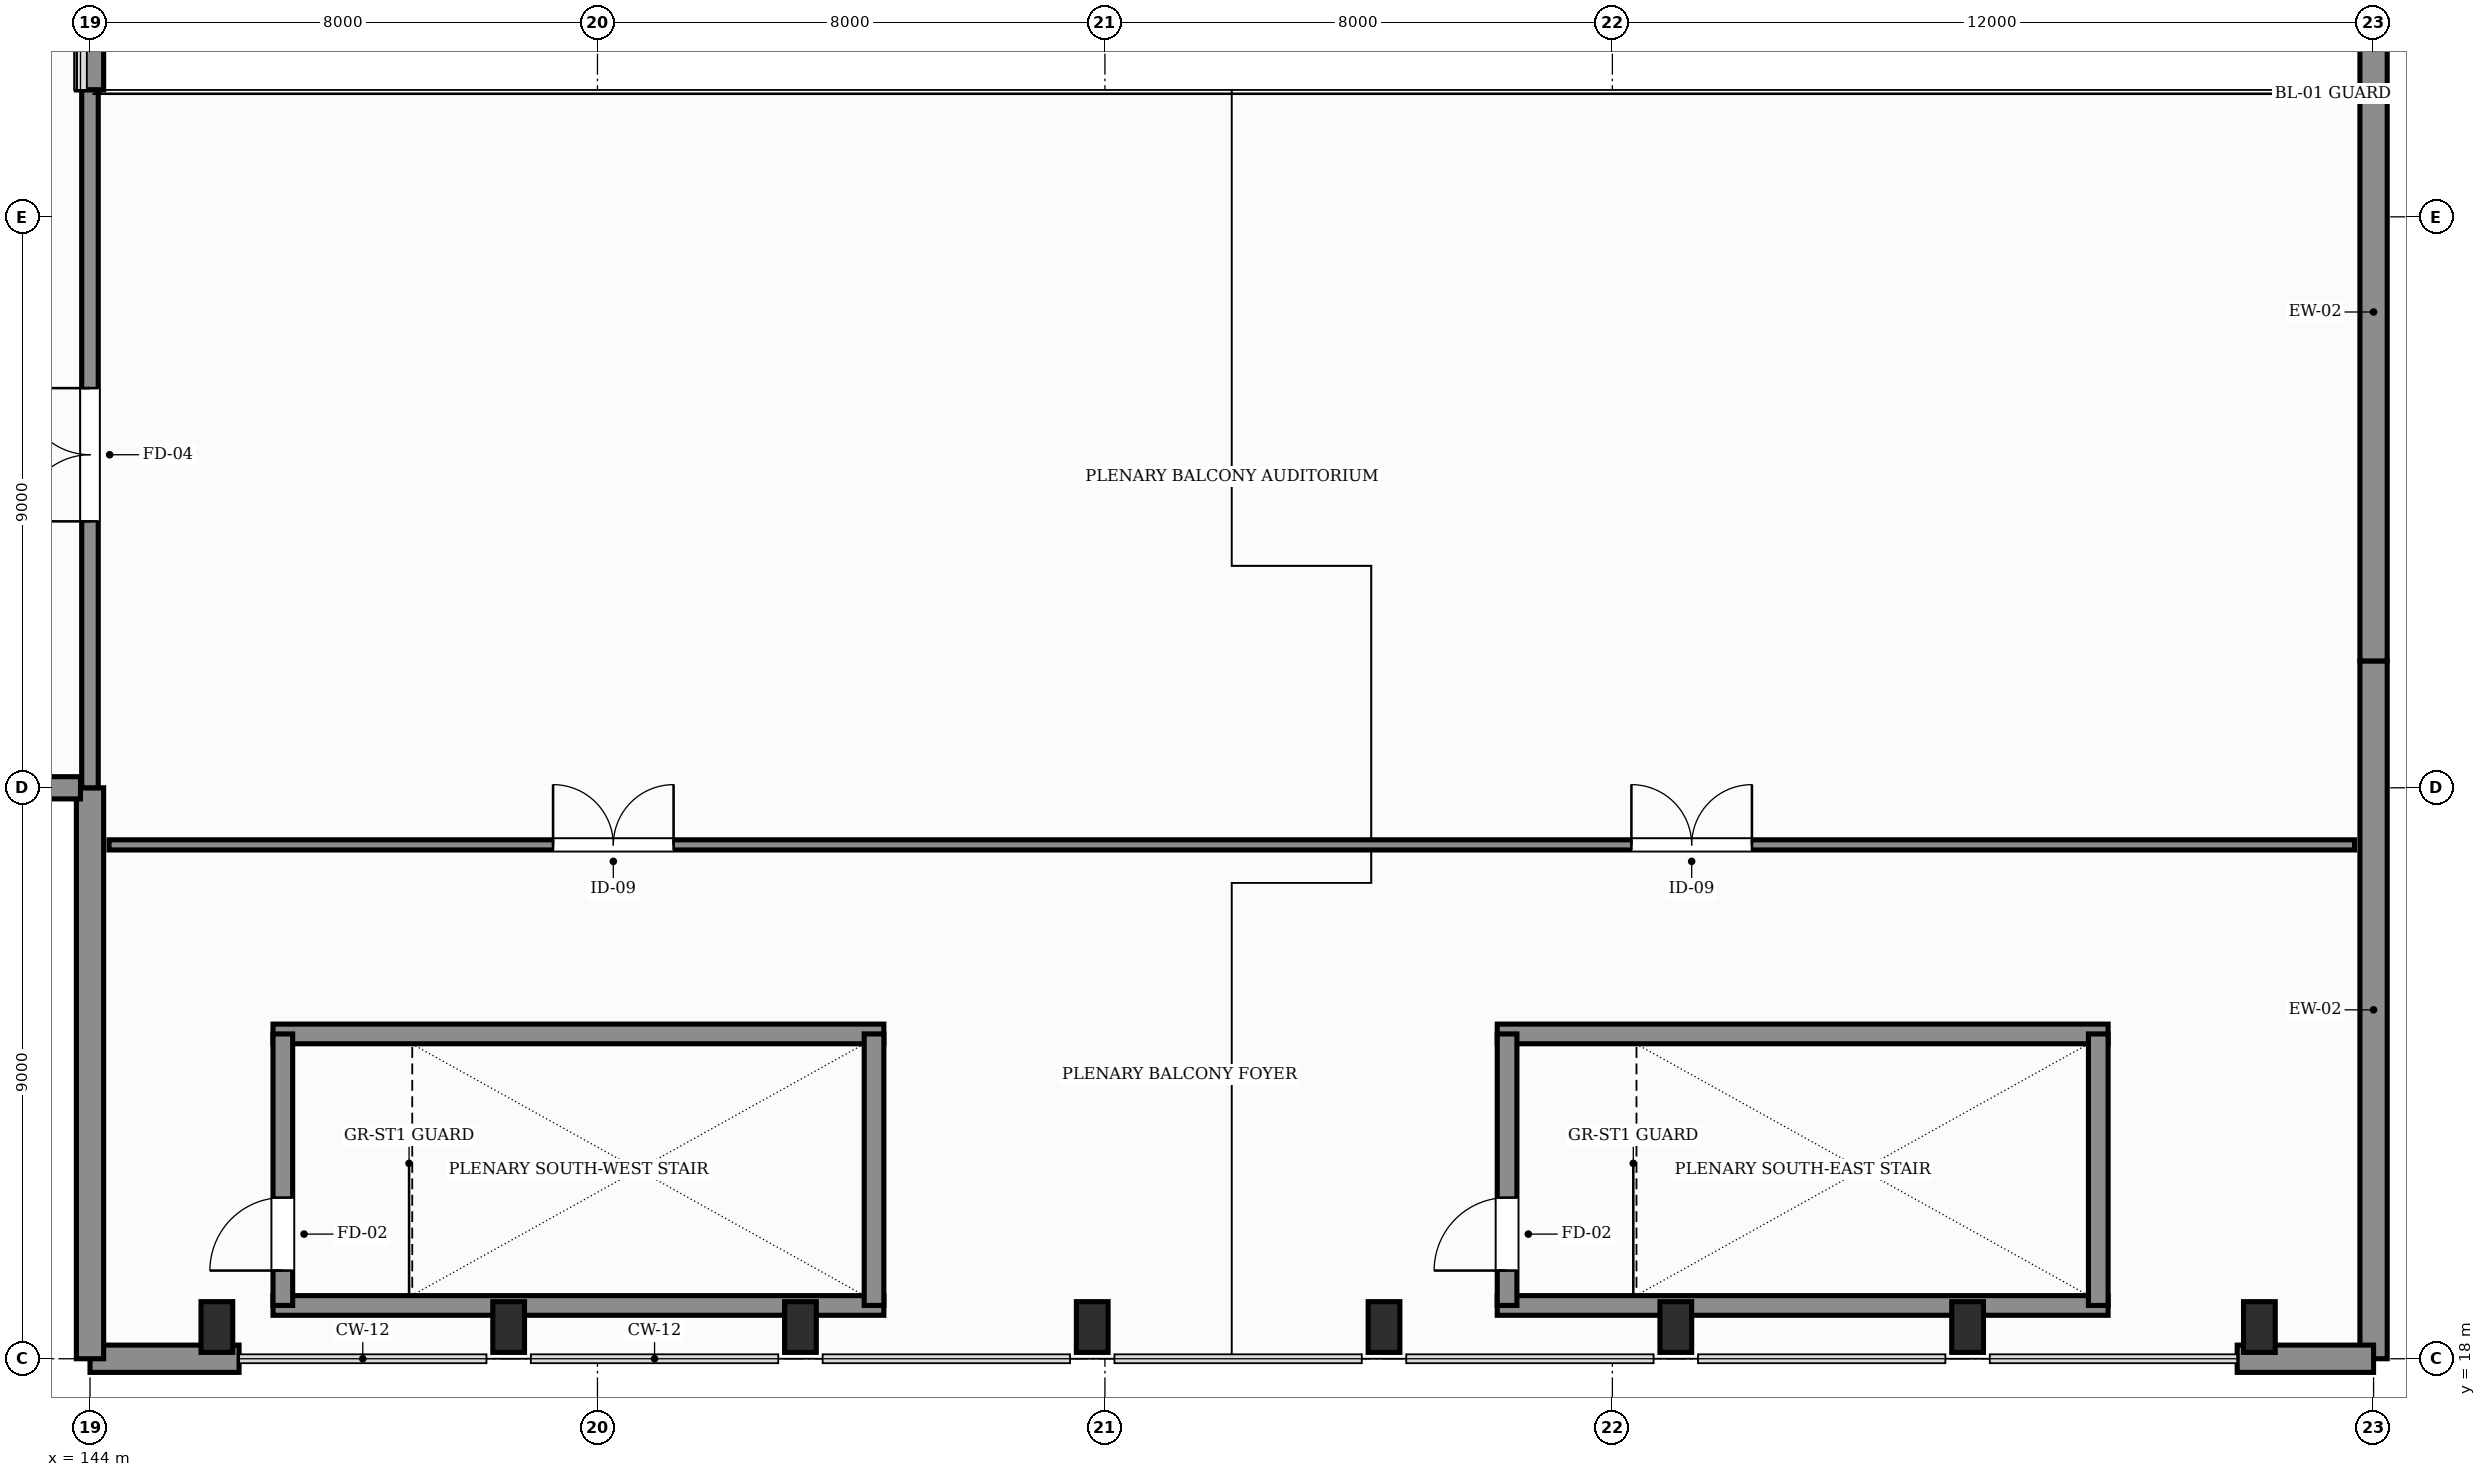
"""IFC4 building model, lengths in metres.
Left out: names, types, materials, properties, quantities, classifications, styles, units other than length and angle.
Written with IfcOpenShell. Run it as: python <this file> out.ifc"""

import sys

from ifc_helpers import new_model, si_unit, direction, frame, frame_2d, origin, origin_2d, place, context, subcontext, project, spatial, rectangle, extrude, element, fill, save


model = new_model("IFC4")
c1 = context("Model", 3, precision=1e-05, world=origin(), true_north=direction((0.0, 1.0)))
c2 = subcontext(c1, "Body", "Model", "MODEL_VIEW")
j1 = project(units=[si_unit("LENGTHUNIT", "METRE"), si_unit("PLANEANGLEUNIT", "RADIAN")], contexts=[c1])
p1 = place(None, origin())
s1 = spatial("IfcSite", under=j1, at=p1, CompositionType="ELEMENT")
p2 = place(p1, origin())
s2 = spatial("IfcBuilding", under=s1, at=p2, CompositionType="ELEMENT")
p3 = place(p2, frame((0.0, 0.0, 11.4)))
s3 = spatial("IfcBuildingStorey", under=s2, at=p3, CompositionType="ELEMENT", Elevation=11.4)
for number, where, z_axis, x_axis in (
    (1, (146.0, 18.5, 0.0), (0.0, 0.0, 1.0), (1.0, 0.0, 0.0)),
    (2, (150.6, 18.5, 0.0), (0.0, 0.0, 1.0), (1.0, 0.0, 0.0)),
    (3, (155.2, 18.5, 0.0), (0.0, 0.0, 1.0), (1.0, 0.0, 0.0)),
    (4, (159.8, 18.5, 0.0), (0.0, 0.0, 1.0), (1.0, 0.0, 0.0)),
    (5, (164.4, 18.5, 0.0), (0.0, 0.0, 1.0), (1.0, 0.0, 0.0)),
    (6, (169.0, 18.5, 0.0), (0.0, 0.0, 1.0), (1.0, 0.0, 0.0)),
    (7, (173.6, 18.5, 0.0), (0.0, 0.0, 1.0), (1.0, 0.0, 0.0)),
    (8, (178.2, 18.5, 0.0), (0.0, 0.0, 1.0), (1.0, 0.0, 0.0)),
):
    element("IfcColumn", number, at=place(p3, frame(where, z_axis=z_axis, x_axis=x_axis)), inside=s3, PredefinedType="PILASTER", context=c2, shape_type="SweptSolid", body=[
        extrude(rectangle(XDim=0.5, YDim=0.8, at=origin_2d()), origin(), (0.0, 0.0, 1.0), 6.0),
    ])
for number, where, z_axis, x_axis in (
    (9, (180.0, 18.0, 0.0), (0.0, 0.0, 1.0), (0.0, 1.0, 0.0)),
    (10, (180.0, 29.0, 0.0), (0.0, 0.0, 1.0), (0.0, 1.0, 0.0)),
):
    element("IfcWall", number, at=place(p3, frame(where, z_axis=z_axis, x_axis=x_axis)), inside=s3, PredefinedType="SOLIDWALL", context=c2, shape_type="SweptSolid", body=[
        extrude(rectangle(XDim=11.0, YDim=0.43, at=frame_2d((5.5, 0.0))), origin(), (0.0, 0.0, 1.0), 5.8),
    ])
p4 = place(p3, frame((144.0, 18.0, 0.0), z_axis=(0.0, 0.0, 1.0), x_axis=(1.0, 0.0, 0.0)))
e11 = element("IfcWall", 11, at=p4, inside=s3, PredefinedType="SOLIDWALL", context=c2, shape_type="SweptSolid", body=[
    extrude(rectangle(XDim=2.35, YDim=0.43, at=frame_2d((1.175, 0.0))), origin(), (0.0, 0.0, 1.0), 5.8),
])
p5 = place(p3, frame((177.85, 18.0, 0.0), z_axis=(0.0, 0.0, 1.0), x_axis=(1.0, 0.0, 0.0)))
e12 = element("IfcWall", 12, at=p5, inside=s3, PredefinedType="SOLIDWALL", context=c2, shape_type="SweptSolid", body=[
    extrude(rectangle(XDim=2.15, YDim=0.43, at=frame_2d((1.075, 0.0))), origin(), (0.0, 0.0, 1.0), 5.8),
])
p6 = place(p3, frame((144.0, 18.0, 0.0), z_axis=(0.0, 0.0, 1.0), x_axis=(0.0, 1.0, 0.0)))
e13 = element("IfcWall", 13, at=p6, inside=s3, PredefinedType="SOLIDWALL", context=c2, shape_type="SweptSolid", body=[
    extrude(rectangle(XDim=9.0, YDim=0.43, at=frame_2d((4.5, 0.0))), origin(), (0.0, 0.0, 1.0), 5.8),
])
p7 = place(p3, frame((144.0, 38.0, 0.0), z_axis=(0.0, 0.0, 1.0), x_axis=(0.0, 1.0, 0.0)))
e14 = element("IfcWall", 14, at=p7, inside=s3, PredefinedType="SOLIDWALL", context=c2, shape_type="SweptSolid", body=[
    extrude(rectangle(XDim=10.0, YDim=0.43, at=frame_2d((5.0, 0.0))), origin(), (0.0, 0.0, 1.0), 5.8),
])
p8 = place(p3, frame((136.0, 27.0, 0.0), z_axis=(0.0, 0.0, 1.0), x_axis=(1.0, 0.0, 0.0)))
e15 = element("IfcWall", 15, at=p8, inside=s3, PredefinedType="SOLIDWALL", context=c2, shape_type="SweptSolid", body=[
    extrude(rectangle(XDim=7.85, YDim=0.35, at=frame_2d((3.925, 0.0))), origin(), (0.0, 0.0, 1.0), 3.5),
])
p9 = place(p8, frame((2.625, 0.0, 0.95)))
e16 = element("IfcOpeningElement", 16, at=p9, cuts=e15, PredefinedType="OPENING", context=c2, shape_type="SweptSolid", body=[
    extrude(rectangle(XDim=2.6, YDim=1.65, at=frame_2d((1.3, 0.825))), frame((0.0, 0.185, 0.0), z_axis=(0.0, -1.0, 0.0), x_axis=(1.0, 0.0, 0.0)), (0.0, 0.0, 1.0), 0.37),
])
for number, where, z_axis, x_axis in (
    (17, (166.185, 18.84, 0.0), (0.0, 0.0, 1.0), (1.0, 0.0, 0.0)),
    (18, (166.185, 23.12, 0.0), (0.0, 0.0, 1.0), (1.0, 0.0, 0.0)),
):
    element("IfcWall", number, at=place(p3, frame(where, z_axis=z_axis, x_axis=x_axis)), inside=s3, PredefinedType="SHEAR", context=c2, shape_type="SweptSolid", body=[
        extrude(rectangle(XDim=9.63, YDim=0.31, at=frame_2d((4.815, 0.0))), origin(), (0.0, 0.0, 1.0), 4.8),
    ])
p10 = place(p3, frame((166.34, 18.84, 0.0), z_axis=(0.0, 0.0, 1.0), x_axis=(0.0, 1.0, 0.0)))
e19 = element("IfcWall", 19, at=p10, inside=s3, PredefinedType="SHEAR", context=c2, shape_type="SweptSolid", body=[
    extrude(rectangle(XDim=4.28, YDim=0.31, at=frame_2d((2.14, 0.0))), origin(), (0.0, 0.0, 1.0), 4.8),
])
p11 = place(p10, frame((0.55, 0.0, 0.0)))
e20 = element("IfcOpeningElement", 20, at=p11, cuts=e19, PredefinedType="OPENING", context=c2, shape_type="SweptSolid", body=[
    extrude(rectangle(XDim=1.15, YDim=2.2, at=frame_2d((0.575, 1.1))), frame((0.0, 0.165, 0.0), z_axis=(0.0, -1.0, 0.0), x_axis=(1.0, 0.0, 0.0)), (0.0, 0.0, 1.0), 0.33),
])
p12 = place(p3, frame((175.66, 18.84, 0.0), z_axis=(0.0, 0.0, 1.0), x_axis=(0.0, 1.0, 0.0)))
e21 = element("IfcWall", 21, at=p12, inside=s3, PredefinedType="SHEAR", context=c2, shape_type="SweptSolid", body=[
    extrude(rectangle(XDim=4.28, YDim=0.31, at=frame_2d((2.14, 0.0))), origin(), (0.0, 0.0, 1.0), 4.8),
])
for number, where, z_axis, x_axis in (
    (22, (146.885, 18.84, 0.0), (0.0, 0.0, 1.0), (1.0, 0.0, 0.0)),
    (23, (146.885, 23.12, 0.0), (0.0, 0.0, 1.0), (1.0, 0.0, 0.0)),
):
    element("IfcWall", number, at=place(p3, frame(where, z_axis=z_axis, x_axis=x_axis)), inside=s3, PredefinedType="SHEAR", context=c2, shape_type="SweptSolid", body=[
        extrude(rectangle(XDim=9.63, YDim=0.31, at=frame_2d((4.815, 0.0))), origin(), (0.0, 0.0, 1.0), 4.8),
    ])
p13 = place(p3, frame((147.04, 18.84, 0.0), z_axis=(0.0, 0.0, 1.0), x_axis=(0.0, 1.0, 0.0)))
e24 = element("IfcWall", 24, at=p13, inside=s3, PredefinedType="SHEAR", context=c2, shape_type="SweptSolid", body=[
    extrude(rectangle(XDim=4.28, YDim=0.31, at=frame_2d((2.14, 0.0))), origin(), (0.0, 0.0, 1.0), 4.8),
])
p14 = place(p13, frame((0.55, 0.0, 0.0)))
e25 = element("IfcOpeningElement", 25, at=p14, cuts=e24, PredefinedType="OPENING", context=c2, shape_type="SweptSolid", body=[
    extrude(rectangle(XDim=1.15, YDim=2.2, at=frame_2d((0.575, 1.1))), frame((0.0, 0.165, 0.0), z_axis=(0.0, -1.0, 0.0), x_axis=(1.0, 0.0, 0.0)), (0.0, 0.0, 1.0), 0.33),
])
p15 = place(p3, frame((156.36, 18.84, 0.0), z_axis=(0.0, 0.0, 1.0), x_axis=(0.0, 1.0, 0.0)))
e26 = element("IfcWall", 26, at=p15, inside=s3, PredefinedType="SHEAR", context=c2, shape_type="SweptSolid", body=[
    extrude(rectangle(XDim=4.28, YDim=0.31, at=frame_2d((2.14, 0.0))), origin(), (0.0, 0.0, 1.0), 4.8),
])
p16 = place(p3, frame((144.0, 27.0, 0.0), z_axis=(0.0, 0.0, 1.0), x_axis=(0.0, 1.0, 0.0)))
e27 = element("IfcWall", 27, at=p16, inside=s3, PredefinedType="SOLIDWALL", context=c2, shape_type="SweptSolid", body=[
    extrude(rectangle(XDim=11.0, YDim=0.26, at=frame_2d((5.5, 0.0))), origin(), (0.0, 0.0, 1.0), 4.8),
])
p17 = place(p16, frame((4.2, 0.0, 0.0)))
e28 = element("IfcOpeningElement", 28, at=p17, cuts=e27, PredefinedType="OPENING", context=c2, shape_type="SweptSolid", body=[
    extrude(rectangle(XDim=2.1, YDim=2.4, at=frame_2d((1.05, 1.2))), frame((0.0, 0.14, 0.0), z_axis=(0.0, -1.0, 0.0), x_axis=(1.0, 0.0, 0.0)), (0.0, 0.0, 1.0), 0.28),
])
p18 = place(p3, frame((144.3, 26.1, 0.0), z_axis=(0.0, 0.0, 1.0), x_axis=(1.0, 0.0, 0.0)))
e29 = element("IfcWall", 29, at=p18, inside=s3, PredefinedType="PARTITIONING", context=c2, shape_type="SweptSolid", body=[
    extrude(rectangle(XDim=35.4, YDim=0.16, at=frame_2d((17.7, 0.0))), origin(), (0.0, 0.0, 1.0), 3.4),
])
p19 = place(p18, frame((7.0, 0.0, 0.0)))
e30 = element("IfcOpeningElement", 30, at=p19, cuts=e29, PredefinedType="OPENING", context=c2, shape_type="SweptSolid", body=[
    extrude(rectangle(XDim=1.9, YDim=2.4, at=frame_2d((0.95, 1.2))), frame((0.0, 0.09, 0.0), z_axis=(0.0, -1.0, 0.0), x_axis=(1.0, 0.0, 0.0)), (0.0, 0.0, 1.0), 0.18),
])
p20 = place(p18, frame((24.0, 0.0, 0.0)))
e31 = element("IfcOpeningElement", 31, at=p20, cuts=e29, PredefinedType="OPENING", context=c2, shape_type="SweptSolid", body=[
    extrude(rectangle(XDim=1.9, YDim=2.4, at=frame_2d((0.95, 1.2))), frame((0.0, 0.09, 0.0), z_axis=(0.0, -1.0, 0.0), x_axis=(1.0, 0.0, 0.0)), (0.0, 0.0, 1.0), 0.18),
])
p21 = place(p11, origin())
e32 = element("IfcDoor", 32, at=p21, inside=s3, OperationType="SINGLE_SWING_LEFT", PredefinedType="DOOR", context=c2, shape_type="SweptSolid", body=[
    extrude(rectangle(XDim=1.15, YDim=2.2, at=frame_2d((0.575, 1.1))), frame((0.0, 0.025, 0.0), z_axis=(0.0, -1.0, 0.0), x_axis=(1.0, 0.0, 0.0)), (0.0, 0.0, 1.0), 0.05),
])
fill(e20, e32)
p22 = place(p14, origin())
e33 = element("IfcDoor", 33, at=p22, inside=s3, OperationType="SINGLE_SWING_LEFT", PredefinedType="DOOR", context=c2, shape_type="SweptSolid", body=[
    extrude(rectangle(XDim=1.15, YDim=2.2, at=frame_2d((0.575, 1.1))), frame((0.0, 0.025, 0.0), z_axis=(0.0, -1.0, 0.0), x_axis=(1.0, 0.0, 0.0)), (0.0, 0.0, 1.0), 0.05),
])
fill(e25, e33)
p23 = place(p17, origin())
e34 = element("IfcDoor", 34, at=p23, inside=s3, OperationType="DOUBLE_DOOR_SINGLE_SWING", PredefinedType="DOOR", context=c2, shape_type="SweptSolid", body=[
    extrude(rectangle(XDim=2.1, YDim=2.4, at=frame_2d((1.05, 1.2))), frame((0.0, 0.025, 0.0), z_axis=(0.0, -1.0, 0.0), x_axis=(1.0, 0.0, 0.0)), (0.0, 0.0, 1.0), 0.05),
])
fill(e28, e34)
p24 = place(p19, origin())
e35 = element("IfcDoor", 35, at=p24, inside=s3, OperationType="DOUBLE_DOOR_SINGLE_SWING", PredefinedType="DOOR", context=c2, shape_type="SweptSolid", body=[
    extrude(rectangle(XDim=1.9, YDim=2.4, at=frame_2d((0.95, 1.2))), frame((0.0, 0.025, 0.0), z_axis=(0.0, -1.0, 0.0), x_axis=(1.0, 0.0, 0.0)), (0.0, 0.0, 1.0), 0.05),
])
fill(e30, e35)
p25 = place(p20, origin())
e36 = element("IfcDoor", 36, at=p25, inside=s3, OperationType="DOUBLE_DOOR_SINGLE_SWING", PredefinedType="DOOR", context=c2, shape_type="SweptSolid", body=[
    extrude(rectangle(XDim=1.9, YDim=2.4, at=frame_2d((0.95, 1.2))), frame((0.0, 0.025, 0.0), z_axis=(0.0, -1.0, 0.0), x_axis=(1.0, 0.0, 0.0)), (0.0, 0.0, 1.0), 0.05),
])
fill(e31, e36)
save(model, sys.argv[1])
